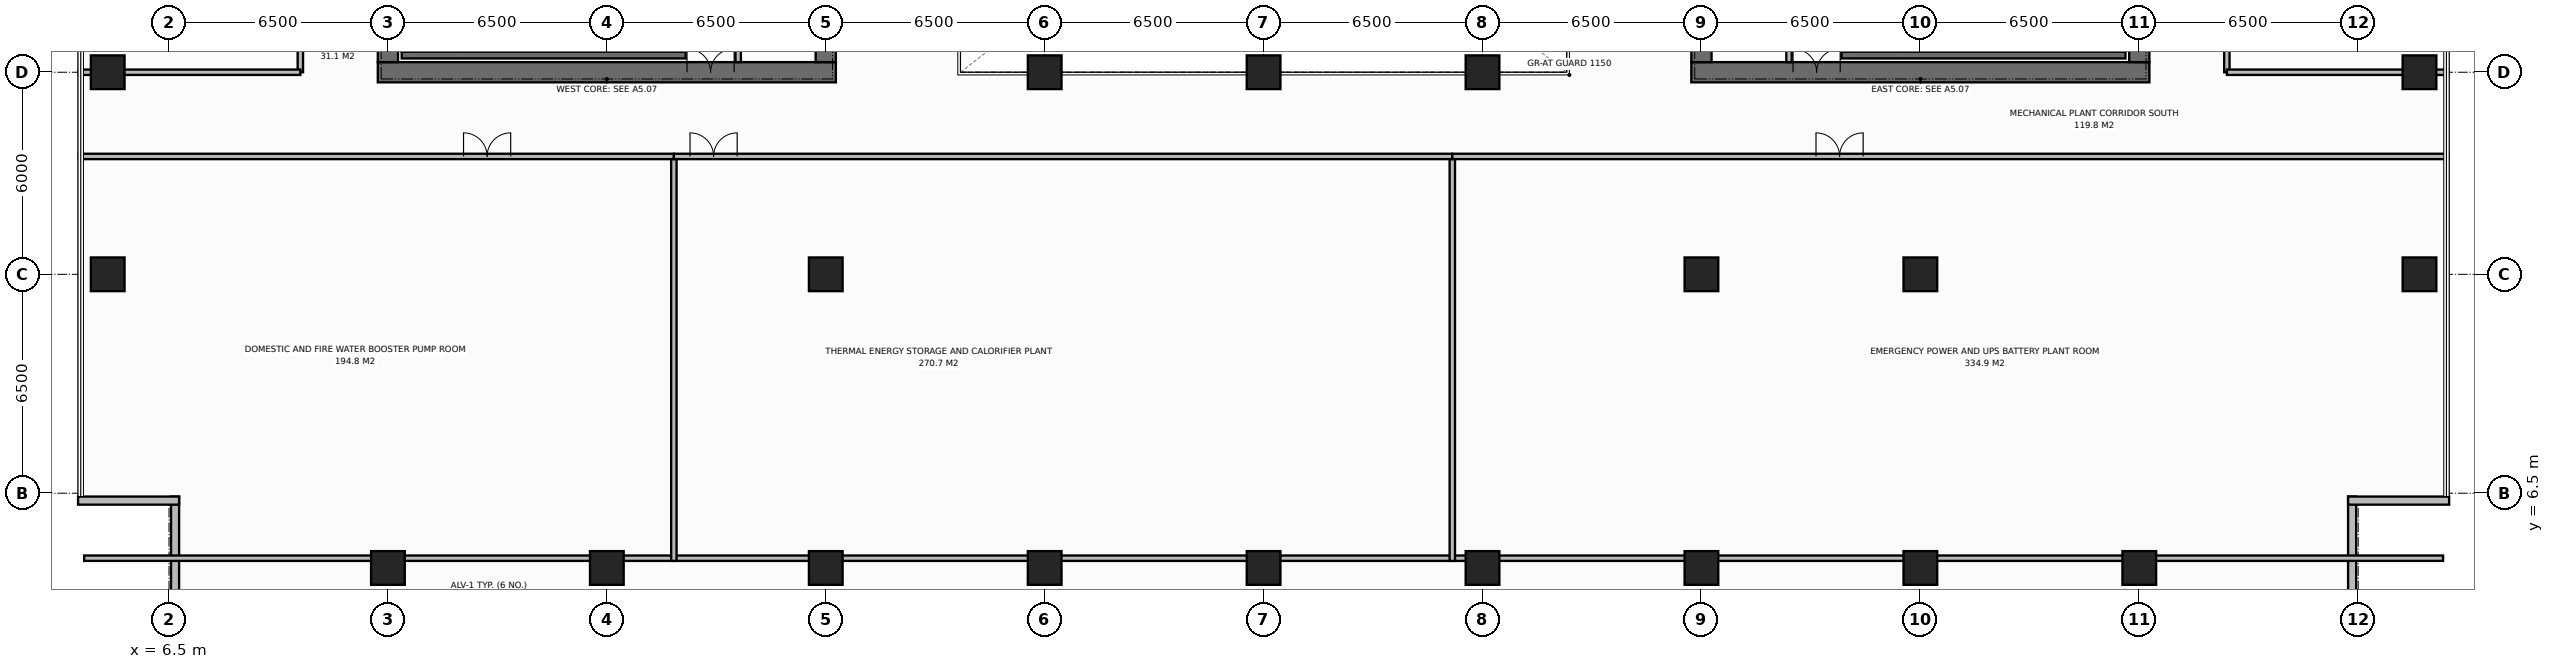
"""IFC4 building model, lengths in metres.
Left out: names, types, materials, properties, quantities, classifications, styles, units other than length and angle.
Written with IfcOpenShell. Run it as: python <this file> out.ifc"""

import sys

from ifc_helpers import new_model, si_unit, direction, frame, frame_2d, origin, origin_2d, place, context, subcontext, project, spatial, rectangle, extrude, element, fill, save


model = new_model("IFC4")
c1 = context("Model", 3, precision=1e-05, world=origin(), true_north=direction((0.0, 1.0)))
c2 = subcontext(c1, "Body", "Model", "MODEL_VIEW")
j1 = project(units=[si_unit("LENGTHUNIT", "METRE"), si_unit("PLANEANGLEUNIT", "RADIAN")], contexts=[c1])
p1 = place(None, origin())
s1 = spatial("IfcSite", under=j1, at=p1, CompositionType="ELEMENT")
p2 = place(p1, origin())
s2 = spatial("IfcBuilding", under=s1, at=p2, CompositionType="ELEMENT")
p3 = place(p2, frame((0.0, 0.0, 197.4)))
s3 = spatial("IfcBuildingStorey", under=s2, at=p3, CompositionType="ELEMENT", Elevation=197.4)
p4 = place(p3, frame((12.7, 19.0, 0.0), z_axis=(0.0, 0.0, 1.0), x_axis=(1.0, 0.0, 0.0)))
e1 = element("IfcWall", 1, at=p4, inside=s3, PredefinedType="SHEAR", context=c2, shape_type="SweptSolid", body=[
    extrude(rectangle(XDim=13.6, YDim=0.6, at=frame_2d((6.8, 0.0))), origin(), (0.0, 0.0, 1.0), 5.0),
])
p5 = place(p4, frame((9.18, 0.0, 0.0)))
e2 = element("IfcOpeningElement", 2, at=p5, cuts=e1, PredefinedType="OPENING", context=c2, shape_type="SweptSolid", body=[
    extrude(rectangle(XDim=1.4, YDim=2.2, at=frame_2d((0.7, 1.1))), frame((0.0, 0.31, 0.0), z_axis=(0.0, -1.0, 0.0), x_axis=(1.0, 0.0, 0.0)), (0.0, 0.0, 1.0), 0.62),
])
p6 = place(p3, frame((13.0, 19.3, 0.0), z_axis=(0.0, 0.0, 1.0), x_axis=(0.0, 1.0, 0.0)))
e3 = element("IfcWall", 3, at=p6, inside=s3, PredefinedType="SHEAR", context=c2, shape_type="SweptSolid", body=[
    extrude(rectangle(XDim=13.4, YDim=0.6, at=frame_2d((6.7, 0.0))), origin(), (0.0, 0.0, 1.0), 5.0),
])
p7 = place(p6, frame((4.75, 0.0, 0.0)))
e4 = element("IfcOpeningElement", 4, at=p7, cuts=e3, PredefinedType="OPENING", context=c2, shape_type="SweptSolid", body=[
    extrude(rectangle(XDim=1.4, YDim=2.2, at=frame_2d((0.7, 1.1))), frame((0.0, 0.31, 0.0), z_axis=(0.0, -1.0, 0.0), x_axis=(1.0, 0.0, 0.0)), (0.0, 0.0, 1.0), 0.62),
])
p8 = place(p3, frame((26.0, 19.3, 0.0), z_axis=(0.0, 0.0, 1.0), x_axis=(0.0, 1.0, 0.0)))
e5 = element("IfcWall", 5, at=p8, inside=s3, PredefinedType="SHEAR", context=c2, shape_type="SweptSolid", body=[
    extrude(rectangle(XDim=13.4, YDim=0.6, at=frame_2d((6.7, 0.0))), origin(), (0.0, 0.0, 1.0), 5.0),
])
p9 = place(p3, frame((51.7, 19.0, 0.0), z_axis=(0.0, 0.0, 1.0), x_axis=(1.0, 0.0, 0.0)))
e6 = element("IfcWall", 6, at=p9, inside=s3, PredefinedType="SHEAR", context=c2, shape_type="SweptSolid", body=[
    extrude(rectangle(XDim=13.6, YDim=0.6, at=frame_2d((6.8, 0.0))), origin(), (0.0, 0.0, 1.0), 5.0),
])
p10 = place(p9, frame((3.02, 0.0, 0.0)))
e7 = element("IfcOpeningElement", 7, at=p10, cuts=e6, PredefinedType="OPENING", context=c2, shape_type="SweptSolid", body=[
    extrude(rectangle(XDim=1.4, YDim=2.2, at=frame_2d((0.7, 1.1))), frame((0.0, 0.31, 0.0), z_axis=(0.0, -1.0, 0.0), x_axis=(1.0, 0.0, 0.0)), (0.0, 0.0, 1.0), 0.62),
])
p11 = place(p3, frame((52.0, 19.3, 0.0), z_axis=(0.0, 0.0, 1.0), x_axis=(0.0, 1.0, 0.0)))
e8 = element("IfcWall", 8, at=p11, inside=s3, PredefinedType="SHEAR", context=c2, shape_type="SweptSolid", body=[
    extrude(rectangle(XDim=13.4, YDim=0.6, at=frame_2d((6.7, 0.0))), origin(), (0.0, 0.0, 1.0), 5.0),
])
p12 = place(p3, frame((65.0, 19.3, 0.0), z_axis=(0.0, 0.0, 1.0), x_axis=(0.0, 1.0, 0.0)))
e9 = element("IfcWall", 9, at=p12, inside=s3, PredefinedType="SHEAR", context=c2, shape_type="SweptSolid", body=[
    extrude(rectangle(XDim=13.4, YDim=0.6, at=frame_2d((6.7, 0.0))), origin(), (0.0, 0.0, 1.0), 5.0),
])
p13 = place(p12, frame((8.15, 0.0, 0.0)))
e10 = element("IfcOpeningElement", 10, at=p13, cuts=e9, PredefinedType="OPENING", context=c2, shape_type="SweptSolid", body=[
    extrude(rectangle(XDim=1.3, YDim=2.2, at=frame_2d((0.65, 1.1))), frame((0.0, 0.31, 0.0), z_axis=(0.0, -1.0, 0.0), x_axis=(1.0, 0.0, 0.0)), (0.0, 0.0, 1.0), 0.62),
])
for number, where, z_axis, x_axis in (
    (11, (13.41, 19.51, 0.0), (0.0, 0.0, 1.0), (1.0, 0.0, 0.0)),
    (12, (56.16, 19.51, 0.0), (0.0, 0.0, 1.0), (1.0, 0.0, 0.0)),
):
    element("IfcWall", number, at=place(p3, frame(where, z_axis=z_axis, x_axis=x_axis)), inside=s3, PredefinedType="SHEAR", context=c2, shape_type="SweptSolid", body=[
        extrude(rectangle(XDim=8.43, YDim=0.2, at=frame_2d((4.215, 0.0))), origin(), (0.0, 0.0, 1.0), 5.0),
    ])
for number, where, z_axis, x_axis in (
    (13, (58.5, 13.0, 0.0), (0.0, 0.0, 1.0), (1.0, 0.0, 0.0)),
    (14, (32.5, 19.0, 0.0), (0.0, 0.0, 1.0), (1.0, 0.0, 0.0)),
    (15, (39.0, 19.0, 0.0), (0.0, 0.0, 1.0), (1.0, 0.0, 0.0)),
    (16, (45.5, 19.0, 0.0), (0.0, 0.0, 1.0), (1.0, 0.0, 0.0)),
    (17, (26.0, 13.0, 0.0), (0.0, 0.0, 1.0), (1.0, 0.0, 0.0)),
    (18, (52.0, 13.0, 0.0), (0.0, 0.0, 1.0), (1.0, 0.0, 0.0)),
    (19, (13.0, 4.28, 0.0), (0.0, 0.0, 1.0), (1.0, 0.0, 0.0)),
    (20, (19.5, 4.28, 0.0), (0.0, 0.0, 1.0), (1.0, 0.0, 0.0)),
    (21, (26.0, 4.28, 0.0), (0.0, 0.0, 1.0), (1.0, 0.0, 0.0)),
    (22, (32.5, 4.28, 0.0), (0.0, 0.0, 1.0), (1.0, 0.0, 0.0)),
    (23, (39.0, 4.28, 0.0), (0.0, 0.0, 1.0), (1.0, 0.0, 0.0)),
    (24, (45.5, 4.28, 0.0), (0.0, 0.0, 1.0), (1.0, 0.0, 0.0)),
    (25, (52.0, 4.28, 0.0), (0.0, 0.0, 1.0), (1.0, 0.0, 0.0)),
    (26, (58.5, 4.28, 0.0), (0.0, 0.0, 1.0), (1.0, 0.0, 0.0)),
    (27, (65.0, 4.28, 0.0), (0.0, 0.0, 1.0), (1.0, 0.0, 0.0)),
    (28, (4.68, 13.0, 0.0), (0.0, 0.0, 1.0), (1.0, 0.0, 0.0)),
    (29, (73.32, 13.0, 0.0), (0.0, 0.0, 1.0), (1.0, 0.0, 0.0)),
    (30, (4.68, 19.0, 0.0), (0.0, 0.0, 1.0), (1.0, 0.0, 0.0)),
    (31, (73.32, 19.0, 0.0), (0.0, 0.0, 1.0), (1.0, 0.0, 0.0)),
):
    element("IfcColumn", number, at=place(p3, frame(where, z_axis=z_axis, x_axis=x_axis)), inside=s3, PredefinedType="COLUMN", context=c2, shape_type="SweptSolid", body=[
        extrude(rectangle(XDim=1.0, YDim=1.0, at=origin_2d()), origin(), (0.0, 0.0, 1.0), 5.0),
    ])
for number, where, z_axis, x_axis in (
    (32, (6.68, 3.4, 0.0), (0.0, 0.0, 1.0), (0.0, 1.0, 0.0)),
    (33, (6.8, 6.28, 0.0), (0.0, 0.0, 1.0), (-1.0, 0.0, 0.0)),
    (34, (71.32, 6.4, 0.0), (0.0, 0.0, 1.0), (0.0, -1.0, 0.0)),
    (35, (74.2, 6.28, 0.0), (0.0, 0.0, 1.0), (-1.0, 0.0, 0.0)),
):
    element("IfcWall", number, at=place(p3, frame(where, z_axis=z_axis, x_axis=x_axis)), inside=s3, PredefinedType="STANDARD", context=c2, shape_type="SweptSolid", body=[
        extrude(rectangle(XDim=3.0, YDim=0.24, at=frame_2d((1.5, 0.0))), origin(), (0.0, 0.0, 1.0), 4.78),
    ])
p14 = place(p3, frame((23.4, 19.3, 0.0), z_axis=(0.0, 0.0, 1.0), x_axis=(0.0, 1.0, 0.0)))
e36 = element("IfcWall", 36, at=p14, inside=s3, PredefinedType="STANDARD", context=c2, shape_type="SweptSolid", body=[
    extrude(rectangle(XDim=13.4, YDim=0.16, at=frame_2d((6.7, 0.0))), origin(), (0.0, 0.0, 1.0), 4.78),
])
p15 = place(p14, frame((2.2, 0.0, 0.0)))
e37 = element("IfcOpeningElement", 37, at=p15, cuts=e36, PredefinedType="OPENING", context=c2, shape_type="SweptSolid", body=[
    extrude(rectangle(XDim=0.95, YDim=2.15, at=frame_2d((0.475, 1.075))), frame((0.0, 0.09, 0.0), z_axis=(0.0, -1.0, 0.0), x_axis=(1.0, 0.0, 0.0)), (0.0, 0.0, 1.0), 0.18),
])
p16 = place(p14, frame((6.3, 0.0, 0.0)))
e38 = element("IfcOpeningElement", 38, at=p16, cuts=e36, PredefinedType="OPENING", context=c2, shape_type="SweptSolid", body=[
    extrude(rectangle(XDim=0.95, YDim=2.15, at=frame_2d((0.475, 1.075))), frame((0.0, 0.09, 0.0), z_axis=(0.0, -1.0, 0.0), x_axis=(1.0, 0.0, 0.0)), (0.0, 0.0, 1.0), 0.18),
])
p17 = place(p14, frame((9.3, 0.0, 0.0)))
e39 = element("IfcOpeningElement", 39, at=p17, cuts=e36, PredefinedType="OPENING", context=c2, shape_type="SweptSolid", body=[
    extrude(rectangle(XDim=1.1, YDim=2.2, at=frame_2d((0.55, 1.1))), frame((0.0, 0.09, 0.0), z_axis=(0.0, -1.0, 0.0), x_axis=(1.0, 0.0, 0.0)), (0.0, 0.0, 1.0), 0.18),
])
p18 = place(p14, frame((11.5, 0.0, 0.0)))
e40 = element("IfcOpeningElement", 40, at=p18, cuts=e36, PredefinedType="OPENING", context=c2, shape_type="SweptSolid", body=[
    extrude(rectangle(XDim=1.1, YDim=2.2, at=frame_2d((0.55, 1.1))), frame((0.0, 0.09, 0.0), z_axis=(0.0, -1.0, 0.0), x_axis=(1.0, 0.0, 0.0)), (0.0, 0.0, 1.0), 0.18),
])
p19 = place(p3, frame((54.6, 19.3, 0.0), z_axis=(0.0, 0.0, 1.0), x_axis=(0.0, 1.0, 0.0)))
e41 = element("IfcWall", 41, at=p19, inside=s3, PredefinedType="STANDARD", context=c2, shape_type="SweptSolid", body=[
    extrude(rectangle(XDim=13.4, YDim=0.16, at=frame_2d((6.7, 0.0))), origin(), (0.0, 0.0, 1.0), 4.78),
])
p20 = place(p19, frame((2.1, 0.0, 0.0)))
e42 = element("IfcOpeningElement", 42, at=p20, cuts=e41, PredefinedType="OPENING", context=c2, shape_type="SweptSolid", body=[
    extrude(rectangle(XDim=0.95, YDim=2.15, at=frame_2d((0.475, 1.075))), frame((0.0, 0.09, 0.0), z_axis=(0.0, -1.0, 0.0), x_axis=(1.0, 0.0, 0.0)), (0.0, 0.0, 1.0), 0.18),
])
p21 = place(p19, frame((6.2, 0.0, 0.0)))
e43 = element("IfcOpeningElement", 43, at=p21, cuts=e41, PredefinedType="OPENING", context=c2, shape_type="SweptSolid", body=[
    extrude(rectangle(XDim=0.95, YDim=2.15, at=frame_2d((0.475, 1.075))), frame((0.0, 0.09, 0.0), z_axis=(0.0, -1.0, 0.0), x_axis=(1.0, 0.0, 0.0)), (0.0, 0.0, 1.0), 0.18),
])
p22 = place(p19, frame((9.3, 0.0, 0.0)))
e44 = element("IfcOpeningElement", 44, at=p22, cuts=e41, PredefinedType="OPENING", context=c2, shape_type="SweptSolid", body=[
    extrude(rectangle(XDim=1.1, YDim=2.2, at=frame_2d((0.55, 1.1))), frame((0.0, 0.09, 0.0), z_axis=(0.0, -1.0, 0.0), x_axis=(1.0, 0.0, 0.0)), (0.0, 0.0, 1.0), 0.18),
])
p23 = place(p19, frame((11.5, 0.0, 0.0)))
e45 = element("IfcOpeningElement", 45, at=p23, cuts=e41, PredefinedType="OPENING", context=c2, shape_type="SweptSolid", body=[
    extrude(rectangle(XDim=1.1, YDim=2.2, at=frame_2d((0.55, 1.1))), frame((0.0, 0.09, 0.0), z_axis=(0.0, -1.0, 0.0), x_axis=(1.0, 0.0, 0.0)), (0.0, 0.0, 1.0), 0.18),
])
p24 = place(p3, frame((3.98, 4.57, 0.0), z_axis=(0.0, 0.0, 1.0), x_axis=(1.0, 0.0, 0.0)))
e46 = element("IfcWall", 46, at=p24, inside=s3, PredefinedType="STANDARD", context=c2, shape_type="SweptSolid", body=[
    extrude(rectangle(XDim=70.04, YDim=0.16, at=frame_2d((35.02, 0.0))), origin(), (0.0, 0.0, 1.0), 4.78),
])
p25 = place(p3, frame((10.4, 19.0, 0.0), z_axis=(0.0, 0.0, 1.0), x_axis=(0.0, 1.0, 0.0)))
e47 = element("IfcWall", 47, at=p25, inside=s3, PredefinedType="STANDARD", context=c2, shape_type="SweptSolid", body=[
    extrude(rectangle(XDim=14.0, YDim=0.16, at=frame_2d((7.0, 0.0))), origin(), (0.0, 0.0, 1.0), 4.78),
])
p26 = place(p25, frame((5.2, 0.0, 0.0)))
e48 = element("IfcOpeningElement", 48, at=p26, cuts=e47, PredefinedType="OPENING", context=c2, shape_type="SweptSolid", body=[
    extrude(rectangle(XDim=1.4, YDim=2.2, at=frame_2d((0.7, 1.1))), frame((0.0, 0.09, 0.0), z_axis=(0.0, -1.0, 0.0), x_axis=(1.0, 0.0, 0.0)), (0.0, 0.0, 1.0), 0.18),
])
p27 = place(p3, frame((3.82, 19.0, 0.0), z_axis=(0.0, 0.0, 1.0), x_axis=(1.0, 0.0, 0.0)))
e49 = element("IfcWall", 49, at=p27, inside=s3, PredefinedType="STANDARD", context=c2, shape_type="SweptSolid", body=[
    extrude(rectangle(XDim=6.58, YDim=0.16, at=frame_2d((3.29, 0.0))), origin(), (0.0, 0.0, 1.0), 3.26),
])
p28 = place(p3, frame((67.6, 19.0, 0.0), z_axis=(0.0, 0.0, 1.0), x_axis=(0.0, 1.0, 0.0)))
e50 = element("IfcWall", 50, at=p28, inside=s3, PredefinedType="STANDARD", context=c2, shape_type="SweptSolid", body=[
    extrude(rectangle(XDim=14.0, YDim=0.16, at=frame_2d((7.0, 0.0))), origin(), (0.0, 0.0, 1.0), 4.78),
])
p29 = place(p28, frame((5.2, 0.0, 0.0)))
e51 = element("IfcOpeningElement", 51, at=p29, cuts=e50, PredefinedType="OPENING", context=c2, shape_type="SweptSolid", body=[
    extrude(rectangle(XDim=1.4, YDim=2.2, at=frame_2d((0.7, 1.1))), frame((0.0, 0.09, 0.0), z_axis=(0.0, -1.0, 0.0), x_axis=(1.0, 0.0, 0.0)), (0.0, 0.0, 1.0), 0.18),
])
p30 = place(p3, frame((67.6, 19.0, 0.0), z_axis=(0.0, 0.0, 1.0), x_axis=(1.0, 0.0, 0.0)))
e52 = element("IfcWall", 52, at=p30, inside=s3, PredefinedType="STANDARD", context=c2, shape_type="SweptSolid", body=[
    extrude(rectangle(XDim=6.58, YDim=0.16, at=frame_2d((3.29, 0.0))), origin(), (0.0, 0.0, 1.0), 3.26),
])
p31 = place(p3, frame((21.49, 4.49, 0.0), z_axis=(0.0, 0.0, 1.0), x_axis=(0.0, 1.0, 0.0)))
e53 = element("IfcWall", 53, at=p31, inside=s3, PredefinedType="STANDARD", context=c2, shape_type="SweptSolid", body=[
    extrude(rectangle(XDim=12.01, YDim=0.16, at=frame_2d((6.005, 0.0))), origin(), (0.0, 0.0, 1.0), 4.78),
])
p32 = place(p3, frame((3.82, 16.5, 0.0), z_axis=(0.0, 0.0, 1.0), x_axis=(1.0, 0.0, 0.0)))
e54 = element("IfcWall", 54, at=p32, inside=s3, PredefinedType="STANDARD", context=c2, shape_type="SweptSolid", body=[
    extrude(rectangle(XDim=17.67, YDim=0.16, at=frame_2d((8.835, 0.0))), origin(), (0.0, 0.0, 1.0), 4.78),
])
p33 = place(p32, frame((11.425, 0.0, 0.0)))
e55 = element("IfcOpeningElement", 55, at=p33, cuts=e54, PredefinedType="OPENING", context=c2, shape_type="SweptSolid", body=[
    extrude(rectangle(XDim=1.4, YDim=2.2, at=frame_2d((0.7, 1.1))), frame((0.0, 0.09, 0.0), z_axis=(0.0, -1.0, 0.0), x_axis=(1.0, 0.0, 0.0)), (0.0, 0.0, 1.0), 0.18),
])
p34 = place(p3, frame((44.603, 4.49, 0.0), z_axis=(0.0, 0.0, 1.0), x_axis=(0.0, 1.0, 0.0)))
e56 = element("IfcWall", 56, at=p34, inside=s3, PredefinedType="STANDARD", context=c2, shape_type="SweptSolid", body=[
    extrude(rectangle(XDim=12.01, YDim=0.16, at=frame_2d((6.005, 0.0))), origin(), (0.0, 0.0, 1.0), 4.78),
])
p35 = place(p3, frame((21.49, 16.5, 0.0), z_axis=(0.0, 0.0, 1.0), x_axis=(1.0, 0.0, 0.0)))
e57 = element("IfcWall", 57, at=p35, inside=s3, PredefinedType="STANDARD", context=c2, shape_type="SweptSolid", body=[
    extrude(rectangle(XDim=23.113, YDim=0.16, at=frame_2d((11.557, 0.0))), origin(), (0.0, 0.0, 1.0), 4.78),
])
p36 = place(p35, frame((0.48, 0.0, 0.0)))
e58 = element("IfcOpeningElement", 58, at=p36, cuts=e57, PredefinedType="OPENING", context=c2, shape_type="SweptSolid", body=[
    extrude(rectangle(XDim=1.4, YDim=2.2, at=frame_2d((0.7, 1.1))), frame((0.0, 0.09, 0.0), z_axis=(0.0, -1.0, 0.0), x_axis=(1.0, 0.0, 0.0)), (0.0, 0.0, 1.0), 0.18),
])
p37 = place(p3, frame((44.603, 16.5, 0.0), z_axis=(0.0, 0.0, 1.0), x_axis=(1.0, 0.0, 0.0)))
e59 = element("IfcWall", 59, at=p37, inside=s3, PredefinedType="STANDARD", context=c2, shape_type="SweptSolid", body=[
    extrude(rectangle(XDim=29.577, YDim=0.16, at=frame_2d((14.788, 0.0))), origin(), (0.0, 0.0, 1.0), 4.78),
])
p38 = place(p37, frame((10.798, 0.0, 0.0)))
e60 = element("IfcOpeningElement", 60, at=p38, cuts=e59, PredefinedType="OPENING", context=c2, shape_type="SweptSolid", body=[
    extrude(rectangle(XDim=1.4, YDim=2.2, at=frame_2d((0.7, 1.1))), frame((0.0, 0.09, 0.0), z_axis=(0.0, -1.0, 0.0), x_axis=(1.0, 0.0, 0.0)), (0.0, 0.0, 1.0), 0.18),
])
p39 = place(p5, origin())
e61 = element("IfcDoor", 61, at=p39, inside=s3, OperationType="DOUBLE_DOOR_SINGLE_SWING", PredefinedType="DOOR", context=c2, shape_type="SweptSolid", body=[
    extrude(rectangle(XDim=1.4, YDim=2.2, at=frame_2d((0.7, 1.1))), frame((0.0, 0.075, 0.0), z_axis=(0.0, -1.0, 0.0), x_axis=(1.0, 0.0, 0.0)), (0.0, 0.0, 1.0), 0.05),
])
fill(e2, e61)
p40 = place(p10, origin())
e62 = element("IfcDoor", 62, at=p40, inside=s3, OperationType="DOUBLE_DOOR_SINGLE_SWING", PredefinedType="DOOR", context=c2, shape_type="SweptSolid", body=[
    extrude(rectangle(XDim=1.4, YDim=2.2, at=frame_2d((0.7, 1.1))), frame((0.0, 0.075, 0.0), z_axis=(0.0, -1.0, 0.0), x_axis=(1.0, 0.0, 0.0)), (0.0, 0.0, 1.0), 0.05),
])
fill(e7, e62)
p41 = place(p33, origin())
e63 = element("IfcDoor", 63, at=p41, inside=s3, OperationType="DOUBLE_DOOR_SINGLE_SWING", PredefinedType="DOOR", context=c2, shape_type="SweptSolid", body=[
    extrude(rectangle(XDim=1.4, YDim=2.2, at=frame_2d((0.7, 1.1))), frame((0.0, 0.025, 0.0), z_axis=(0.0, -1.0, 0.0), x_axis=(1.0, 0.0, 0.0)), (0.0, 0.0, 1.0), 0.05),
])
fill(e55, e63)
p42 = place(p36, origin())
e64 = element("IfcDoor", 64, at=p42, inside=s3, OperationType="DOUBLE_DOOR_SINGLE_SWING", PredefinedType="DOOR", context=c2, shape_type="SweptSolid", body=[
    extrude(rectangle(XDim=1.4, YDim=2.2, at=frame_2d((0.7, 1.1))), frame((0.0, 0.025, 0.0), z_axis=(0.0, -1.0, 0.0), x_axis=(1.0, 0.0, 0.0)), (0.0, 0.0, 1.0), 0.05),
])
fill(e58, e64)
p43 = place(p38, origin())
e65 = element("IfcDoor", 65, at=p43, inside=s3, OperationType="DOUBLE_DOOR_SINGLE_SWING", PredefinedType="DOOR", context=c2, shape_type="SweptSolid", body=[
    extrude(rectangle(XDim=1.4, YDim=2.2, at=frame_2d((0.7, 1.1))), frame((0.0, 0.025, 0.0), z_axis=(0.0, -1.0, 0.0), x_axis=(1.0, 0.0, 0.0)), (0.0, 0.0, 1.0), 0.05),
])
fill(e60, e65)
save(model, sys.argv[1])
